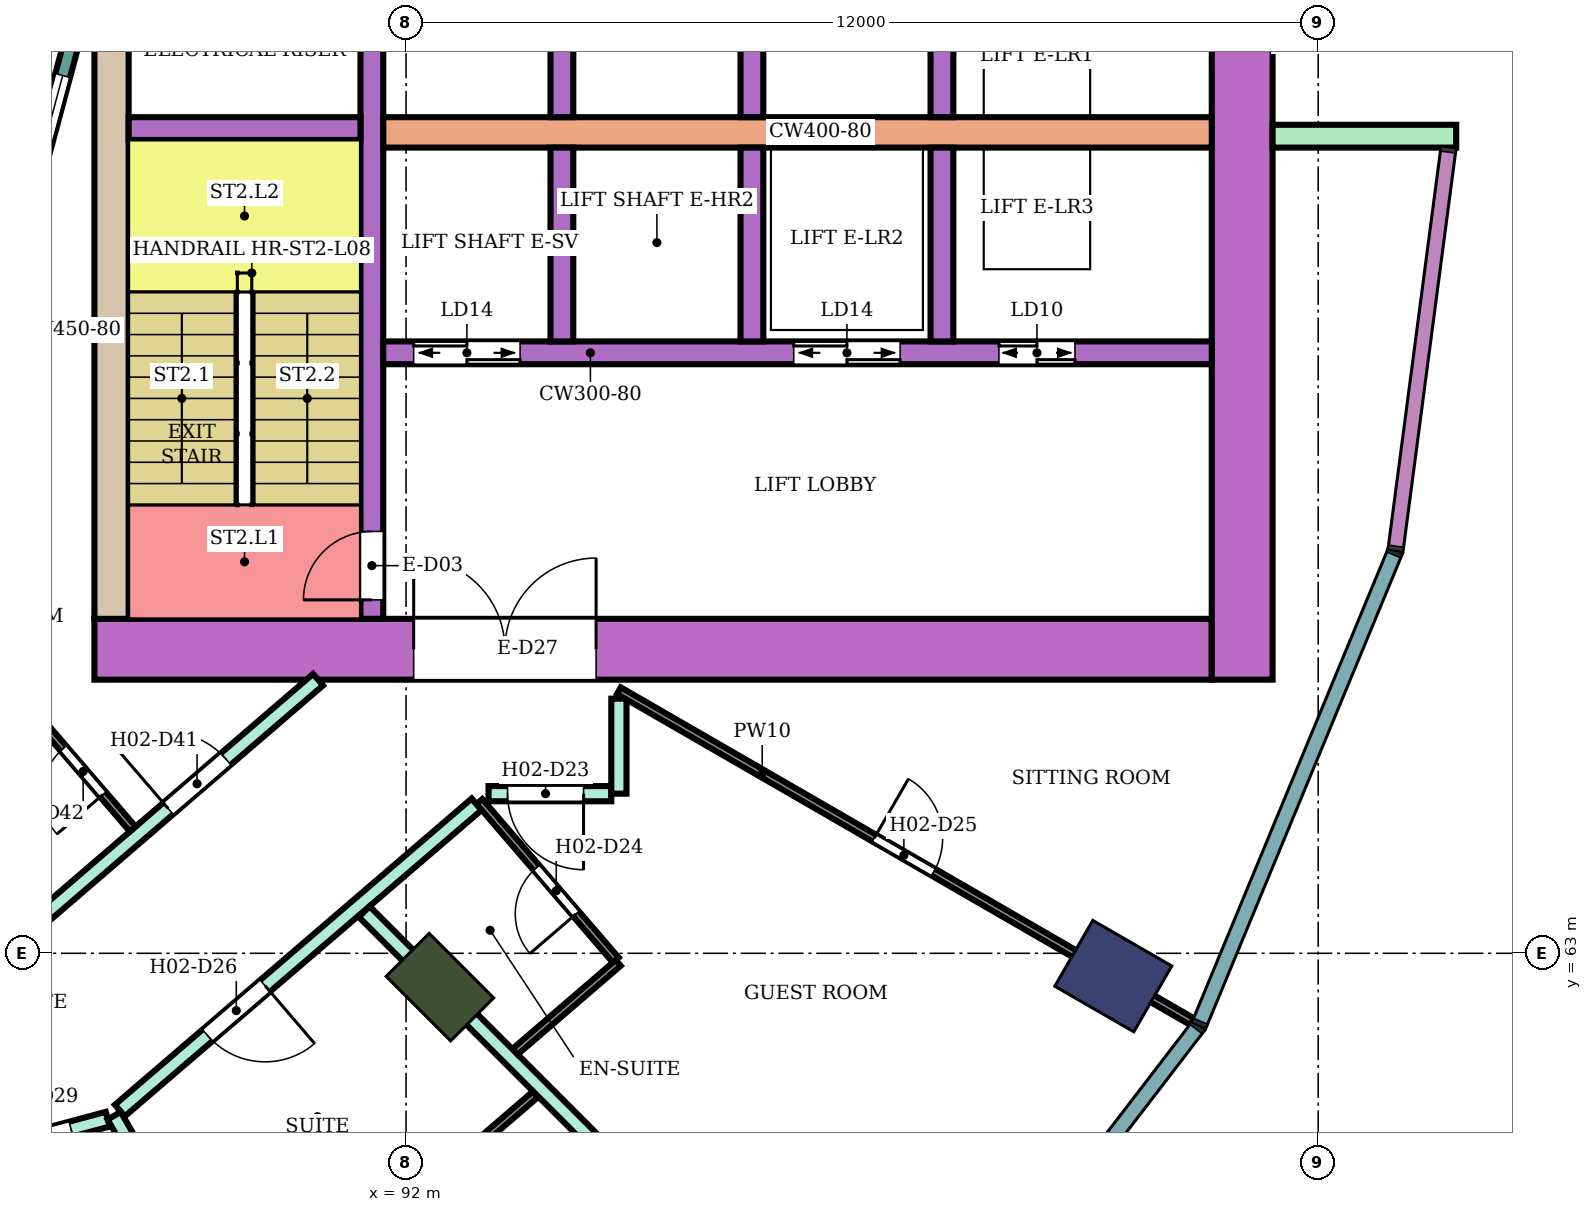
"""IFC4 building model, lengths in metres.
Left out: names, types, materials, properties, quantities, classifications, styles, units other than length and angle.
Written with IfcOpenShell. Run it as: python <this file> out.ifc"""

import sys

from ifc_helpers import new_model, si_unit, direction, frame, frame_2d, origin, origin_2d, place, context, subcontext, project, spatial, rectangle, extrude, element, fill, save


model = new_model("IFC4")
c1 = context("Model", 3, precision=1e-05, world=origin(), true_north=direction((0.0, 1.0)))
c2 = subcontext(c1, "Body", "Model", "MODEL_VIEW")
j1 = project(units=[si_unit("LENGTHUNIT", "METRE"), si_unit("PLANEANGLEUNIT", "RADIAN")], contexts=[c1])
p1 = place(None, origin())
s1 = spatial("IfcSite", under=j1, at=p1, CompositionType="ELEMENT")
p2 = place(p1, origin())
s2 = spatial("IfcBuilding", under=s1, at=p2, CompositionType="ELEMENT")
p3 = place(p2, frame((0.0, 0.0, 40.2)))
s3 = spatial("IfcBuildingStorey", under=s2, at=p3, CompositionType="ELEMENT", Elevation=40.2)
p4 = place(p3, frame((101.304, 62.7, 0.0), z_axis=(0.0, 0.0, 1.0), x_axis=(0.866025403784, -0.5, 0.0)))
e1 = element("IfcColumn", 1, at=p4, inside=s3, PredefinedType="COLUMN", context=c2, shape_type="SweptSolid", body=[
    extrude(rectangle(XDim=1.2, YDim=1.0, at=origin_2d()), origin(), (0.0, 0.0, 1.0), 3.8),
])
p5 = place(p3, frame((92.445, 62.555, 0.0), z_axis=(0.0, 0.0, 1.0), x_axis=(0.707106781187, -0.707106781187, 0.0)))
e2 = element("IfcColumn", 2, at=p5, inside=s3, PredefinedType="COLUMN", context=c2, shape_type="SweptSolid", body=[
    extrude(rectangle(XDim=1.2, YDim=0.8, at=origin_2d()), origin(), (0.0, 0.0, 1.0), 3.8),
])
p6 = place(p3, frame((87.9, 67.0, 0.0), z_axis=(0.0, 0.0, 1.0), x_axis=(1.0, 0.0, 0.0)))
e3 = element("IfcWall", 3, at=p6, inside=s3, PredefinedType="SHEAR", context=c2, shape_type="SweptSolid", body=[
    extrude(rectangle(XDim=14.7, YDim=0.8, at=frame_2d((7.35, 0.0))), origin(), (0.0, 0.0, 1.0), 3.48),
])
p7 = place(p6, frame((4.2, 0.0, 0.0)))
e4 = element("IfcOpeningElement", 4, at=p7, cuts=e3, PredefinedType="OPENING", context=c2, shape_type="SweptSolid", body=[
    extrude(rectangle(XDim=2.4, YDim=2.4, at=frame_2d((1.2, 1.2))), frame((0.0, 0.41, 0.0), z_axis=(0.0, -1.0, 0.0), x_axis=(1.0, 0.0, 0.0)), (0.0, 0.0, 1.0), 0.82),
])
p8 = place(p3, frame((88.125, 67.4, 0.0), z_axis=(0.0, 0.0, 1.0), x_axis=(0.0, 1.0, 0.0)))
e5 = element("IfcWall", 5, at=p8, inside=s3, PredefinedType="SHEAR", context=c2, shape_type="SweptSolid", body=[
    extrude(rectangle(XDim=7.6, YDim=0.45, at=frame_2d((3.8, 0.0))), origin(), (0.0, 0.0, 1.0), 3.48),
])
p9 = place(p3, frame((103.0, 66.6, 0.0), z_axis=(0.0, 0.0, 1.0), x_axis=(0.0, 1.0, 0.0)))
e6 = element("IfcWall", 6, at=p9, inside=s3, PredefinedType="SHEAR", context=c2, shape_type="SweptSolid", body=[
    extrude(rectangle(XDim=16.8, YDim=0.8, at=frame_2d((8.4, 0.0))), origin(), (0.0, 0.0, 1.0), 3.48),
])
p10 = place(p3, frame((91.55, 67.4, 0.0), z_axis=(0.0, 0.0, 1.0), x_axis=(0.0, 1.0, 0.0)))
e7 = element("IfcWall", 7, at=p10, inside=s3, PredefinedType="SHEAR", context=c2, shape_type="SweptSolid", body=[
    extrude(rectangle(XDim=7.6, YDim=0.3, at=frame_2d((3.8, 0.0))), origin(), (0.0, 0.0, 1.0), 3.48),
])
p11 = place(p10, frame((0.25, 0.0, 0.0)))
e8 = element("IfcOpeningElement", 8, at=p11, cuts=e7, PredefinedType="OPENING", context=c2, shape_type="SweptSolid", body=[
    extrude(rectangle(XDim=0.9, YDim=2.1, at=frame_2d((0.45, 1.05))), frame((0.0, 0.16, 0.0), z_axis=(0.0, -1.0, 0.0), x_axis=(1.0, 0.0, 0.0)), (0.0, 0.0, 1.0), 0.32),
])
p12 = place(p3, frame((88.35, 73.85, 0.0), z_axis=(0.0, 0.0, 1.0), x_axis=(1.0, 0.0, 0.0)))
e9 = element("IfcWall", 9, at=p12, inside=s3, PredefinedType="SHEAR", context=c2, shape_type="SweptSolid", body=[
    extrude(rectangle(XDim=3.05, YDim=0.3, at=frame_2d((1.525, 0.0))), origin(), (0.0, 0.0, 1.0), 3.48),
])
p13 = place(p3, frame((91.7, 73.8, 0.0), z_axis=(0.0, 0.0, 1.0), x_axis=(1.0, 0.0, 0.0)))
e10 = element("IfcWall", 10, at=p13, inside=s3, PredefinedType="SHEAR", context=c2, shape_type="SweptSolid", body=[
    extrude(rectangle(XDim=10.9, YDim=0.4, at=frame_2d((5.45, 0.0))), origin(), (0.0, 0.0, 1.0), 3.48),
])
p14 = place(p3, frame((91.7, 70.9, 0.0), z_axis=(0.0, 0.0, 1.0), x_axis=(1.0, 0.0, 0.0)))
e11 = element("IfcWall", 11, at=p14, inside=s3, PredefinedType="SHEAR", context=c2, shape_type="SweptSolid", body=[
    extrude(rectangle(XDim=10.9, YDim=0.3, at=frame_2d((5.45, 0.0))), origin(), (0.0, 0.0, 1.0), 3.48),
])
p15 = place(p14, frame((0.4, 0.0, 0.0)))
e12 = element("IfcOpeningElement", 12, at=p15, cuts=e11, PredefinedType="OPENING", context=c2, shape_type="SweptSolid", body=[
    extrude(rectangle(XDim=1.4, YDim=2.1, at=frame_2d((0.7, 1.05))), frame((0.0, 0.16, 0.0), z_axis=(0.0, -1.0, 0.0), x_axis=(1.0, 0.0, 0.0)), (0.0, 0.0, 1.0), 0.32),
])
p16 = place(p14, frame((5.4, 0.0, 0.0)))
e13 = element("IfcOpeningElement", 13, at=p16, cuts=e11, PredefinedType="OPENING", context=c2, shape_type="SweptSolid", body=[
    extrude(rectangle(XDim=1.4, YDim=2.1, at=frame_2d((0.7, 1.05))), frame((0.0, 0.16, 0.0), z_axis=(0.0, -1.0, 0.0), x_axis=(1.0, 0.0, 0.0)), (0.0, 0.0, 1.0), 0.32),
])
p17 = place(p14, frame((8.1, 0.0, 0.0)))
e14 = element("IfcOpeningElement", 14, at=p17, cuts=e11, PredefinedType="OPENING", context=c2, shape_type="SweptSolid", body=[
    extrude(rectangle(XDim=1.0, YDim=2.1, at=frame_2d((0.5, 1.05))), frame((0.0, 0.16, 0.0), z_axis=(0.0, -1.0, 0.0), x_axis=(1.0, 0.0, 0.0)), (0.0, 0.0, 1.0), 0.32),
])
for number, where, z_axis, x_axis in (
    (15, (94.05, 74.0, 0.0), (0.0, 0.0, 1.0), (0.0, 1.0, 0.0)),
    (16, (96.55, 74.0, 0.0), (0.0, 0.0, 1.0), (0.0, 1.0, 0.0)),
    (17, (99.05, 74.0, 0.0), (0.0, 0.0, 1.0), (0.0, 1.0, 0.0)),
    (18, (94.05, 71.05, 0.0), (0.0, 0.0, 1.0), (0.0, 1.0, 0.0)),
    (19, (96.55, 71.05, 0.0), (0.0, 0.0, 1.0), (0.0, 1.0, 0.0)),
    (20, (99.05, 71.05, 0.0), (0.0, 0.0, 1.0), (0.0, 1.0, 0.0)),
):
    element("IfcWall", number, at=place(p3, frame(where, z_axis=z_axis, x_axis=x_axis)), inside=s3, PredefinedType="SHEAR", context=c2, shape_type="SweptSolid", body=[
        extrude(rectangle(XDim=2.55, YDim=0.3, at=frame_2d((1.275, 0.0))), origin(), (0.0, 0.0, 1.0), 3.48),
    ])
p18 = place(p3, frame((103.4, 73.75, 0.0), z_axis=(0.0, 0.0, 1.0), x_axis=(1.0, 0.0, 0.0)))
e21 = element("IfcWall", 21, at=p18, inside=s3, PredefinedType="NOTDEFINED", context=c2, shape_type="SweptSolid", body=[
    extrude(rectangle(XDim=2.416, YDim=0.3, at=frame_2d((1.208, 0.0))), origin(), (0.0, 0.0, 1.0), 3.8),
])
p19 = place(p3, frame((86.585, 71.198, 0.0), z_axis=(0.0, 0.0, 1.0), x_axis=(0.258789828301, 0.965933654434, 0.0)))
e22 = element("IfcWall", 22, at=p19, inside=s3, PredefinedType="NOTDEFINED", context=c2, shape_type="SweptSolid", body=[
    extrude(rectangle(XDim=3.936, YDim=0.2, at=frame_2d((1.968, 0.0))), origin(), (0.0, 0.0, 1.0), 3.8),
])
p20 = place(p19, frame((0.468, 0.0, 0.9)))
e23 = element("IfcOpeningElement", 23, at=p20, cuts=e22, PredefinedType="OPENING", context=c2, shape_type="SweptSolid", body=[
    extrude(rectangle(XDim=3.0, YDim=2.3, at=frame_2d((1.5, 1.15))), frame((0.0, 0.11, 0.0), z_axis=(0.0, -1.0, 0.0), x_axis=(1.0, 0.0, 0.0)), (0.0, 0.0, 1.0), 0.22),
])
p21 = place(p3, frame((80.0, 58.655, 0.0), z_axis=(0.0, 0.0, 1.0), x_axis=(0.965967338894, 0.258664068224, 0.0)))
e24 = element("IfcWall", 24, at=p21, inside=s3, PredefinedType="PARTITIONING", context=c2, shape_type="SweptSolid", body=[
    extrude(rectangle(XDim=8.36, YDim=0.2, at=frame_2d((4.18, 0.0))), origin(), (0.0, 0.0, 1.0), 3.35),
])
p22 = place(p21, frame((6.86, 0.0, 0.0)))
e25 = element("IfcOpeningElement", 25, at=p22, cuts=e24, PredefinedType="OPENING", context=c2, shape_type="SweptSolid", body=[
    extrude(rectangle(XDim=1.0, YDim=2.1, at=frame_2d((0.5, 1.05))), frame((0.0, 0.11, 0.0), z_axis=(0.0, -1.0, 0.0), x_axis=(1.0, 0.0, 0.0)), (0.0, 0.0, 1.0), 0.22),
])
p23 = place(p21, frame((1.675, 0.0, 0.0)))
e26 = element("IfcOpeningElement", 26, at=p23, cuts=e24, PredefinedType="OPENING", context=c2, shape_type="SweptSolid", body=[
    extrude(rectangle(XDim=0.9, YDim=2.1, at=frame_2d((0.45, 1.05))), frame((0.0, 0.11, 0.0), z_axis=(0.0, -1.0, 0.0), x_axis=(1.0, 0.0, 0.0)), (0.0, 0.0, 1.0), 0.22),
])
p24 = place(p3, frame((86.877, 63.189, 0.0), z_axis=(0.0, 0.0, 1.0), x_axis=(0.758164888471, 0.652062881853, 0.0)))
e27 = element("IfcWall", 27, at=p24, inside=s3, PredefinedType="PARTITIONING", context=c2, shape_type="SweptSolid", body=[
    extrude(rectangle(XDim=5.23, YDim=0.2, at=frame_2d((2.615, 0.0))), origin(), (0.0, 0.0, 1.0), 3.35),
])
p25 = place(p24, frame((2.63, 0.0, 0.0)))
e28 = element("IfcOpeningElement", 28, at=p25, cuts=e27, PredefinedType="OPENING", context=c2, shape_type="SweptSolid", body=[
    extrude(rectangle(XDim=1.0, YDim=2.1, at=frame_2d((0.5, 1.05))), frame((0.0, 0.11, 0.0), z_axis=(0.0, -1.0, 0.0), x_axis=(1.0, 0.0, 0.0)), (0.0, 0.0, 1.0), 0.22),
])
p26 = place(p3, frame((88.235, 60.931, 0.0), z_axis=(0.0, 0.0, 1.0), x_axis=(0.758799498714, 0.651324282329, 0.0)))
e29 = element("IfcWall", 29, at=p26, inside=s3, PredefinedType="PARTITIONING", context=c2, shape_type="SweptSolid", body=[
    extrude(rectangle(XDim=6.186, YDim=0.2, at=frame_2d((3.093, 0.0))), origin(), (0.0, 0.0, 1.0), 3.35),
])
p27 = place(p26, frame((1.519, 0.0, 0.0)))
e30 = element("IfcOpeningElement", 30, at=p27, cuts=e29, PredefinedType="OPENING", context=c2, shape_type="SweptSolid", body=[
    extrude(rectangle(XDim=1.0, YDim=2.1, at=frame_2d((0.5, 1.05))), frame((0.0, 0.11, 0.0), z_axis=(0.0, -1.0, 0.0), x_axis=(1.0, 0.0, 0.0)), (0.0, 0.0, 1.0), 0.22),
])
p28 = place(p3, frame((88.159, 60.863, 0.0), z_axis=(0.0, 0.0, 1.0), x_axis=(0.499897184548, -0.866084756177, 0.0)))
e31 = element("IfcWall", 31, at=p28, inside=s3, PredefinedType="PARTITIONING", context=c2, shape_type="SweptSolid", body=[
    extrude(rectangle(XDim=9.475, YDim=0.2, at=frame_2d((4.737, 0.0))), origin(), (0.0, 0.0, 1.0), 3.35),
])
p29 = place(p3, frame((91.449, 63.548, 0.0), z_axis=(0.0, 0.0, 1.0), x_axis=(0.706984810649, -0.707228730688, 0.0)))
e32 = element("IfcWall", 32, at=p29, inside=s3, PredefinedType="PARTITIONING", context=c2, shape_type="SweptSolid", body=[
    extrude(rectangle(XDim=7.006, YDim=0.2, at=frame_2d((3.503, 0.0))), origin(), (0.0, 0.0, 1.0), 3.35),
])
p30 = place(p3, frame((93.085, 65.1, 0.0), z_axis=(0.0, 0.0, 1.0), x_axis=(1.0, 0.0, 0.0)))
e33 = element("IfcWall", 33, at=p30, inside=s3, PredefinedType="PARTITIONING", context=c2, shape_type="SweptSolid", body=[
    extrude(rectangle(XDim=1.615, YDim=0.2, at=frame_2d((0.808, 0.0))), origin(), (0.0, 0.0, 1.0), 3.35),
])
p31 = place(p30, frame((0.25, 0.0, 0.0)))
e34 = element("IfcOpeningElement", 34, at=p31, cuts=e33, PredefinedType="OPENING", context=c2, shape_type="SweptSolid", body=[
    extrude(rectangle(XDim=1.0, YDim=2.1, at=frame_2d((0.5, 1.05))), frame((0.0, 0.11, 0.0), z_axis=(0.0, -1.0, 0.0), x_axis=(1.0, 0.0, 0.0)), (0.0, 0.0, 1.0), 0.22),
])
p32 = place(p3, frame((94.8, 65.1, 0.0), z_axis=(0.0, 0.0, 1.0), x_axis=(0.0, 1.0, 0.0)))
e35 = element("IfcWall", 35, at=p32, inside=s3, PredefinedType="PARTITIONING", context=c2, shape_type="SweptSolid", body=[
    extrude(rectangle(XDim=1.25, YDim=0.2, at=frame_2d((0.625, 0.0))), origin(), (0.0, 0.0, 1.0), 3.35),
])
p33 = place(p3, frame((86.643, 66.681, 0.0), z_axis=(0.0, 0.0, 1.0), x_axis=(0.652264876065, -0.757991115682, 0.0)))
e36 = element("IfcWall", 36, at=p33, inside=s3, PredefinedType="PARTITIONING", context=c2, shape_type="SweptSolid", body=[
    extrude(rectangle(XDim=2.699, YDim=0.1, at=frame_2d((1.35, 0.0))), origin(), (0.0, 0.0, 1.0), 3.35),
])
p34 = place(p33, frame((1.3, 0.0, 0.0)))
e37 = element("IfcOpeningElement", 37, at=p34, cuts=e36, PredefinedType="OPENING", context=c2, shape_type="SweptSolid", body=[
    extrude(rectangle(XDim=0.8, YDim=2.1, at=frame_2d((0.4, 1.05))), frame((0.0, 0.06, 0.0), z_axis=(0.0, -1.0, 0.0), x_axis=(1.0, 0.0, 0.0)), (0.0, 0.0, 1.0), 0.12),
])
p35 = place(p3, frame((89.974, 57.94, 0.0), z_axis=(0.0, 0.0, 1.0), x_axis=(0.75821417454, 0.652005571699, 0.0)))
e38 = element("IfcWall", 38, at=p35, inside=s3, PredefinedType="PARTITIONING", context=c2, shape_type="SweptSolid", body=[
    extrude(rectangle(XDim=4.915, YDim=0.1, at=frame_2d((2.457, 0.0))), origin(), (0.0, 0.0, 1.0), 3.35),
])
p36 = place(p35, frame((1.017, 0.0, 0.0)))
e39 = element("IfcOpeningElement", 39, at=p36, cuts=e38, PredefinedType="OPENING", context=c2, shape_type="SweptSolid", body=[
    extrude(rectangle(XDim=0.9, YDim=2.1, at=frame_2d((0.45, 1.05))), frame((0.0, 0.06, 0.0), z_axis=(0.0, -1.0, 0.0), x_axis=(1.0, 0.0, 0.0)), (0.0, 0.0, 1.0), 0.12),
])
p37 = place(p3, frame((92.965, 64.997, 0.0), z_axis=(0.0, 0.0, 1.0), x_axis=(0.652069888227, -0.758158862553, 0.0)))
e40 = element("IfcWall", 40, at=p37, inside=s3, PredefinedType="PARTITIONING", context=c2, shape_type="SweptSolid", body=[
    extrude(rectangle(XDim=2.75, YDim=0.1, at=frame_2d((1.375, 0.0))), origin(), (0.0, 0.0, 1.0), 3.35),
])
p38 = place(p37, frame((1.15, 0.0, 0.0)))
e41 = element("IfcOpeningElement", 41, at=p38, cuts=e40, PredefinedType="OPENING", context=c2, shape_type="SweptSolid", body=[
    extrude(rectangle(XDim=0.8, YDim=2.1, at=frame_2d((0.4, 1.05))), frame((0.0, 0.06, 0.0), z_axis=(0.0, -1.0, 0.0), x_axis=(1.0, 0.0, 0.0)), (0.0, 0.0, 1.0), 0.12),
])
p39 = place(p3, frame((93.435, 61.707, 0.0), z_axis=(0.0, 0.0, 1.0), x_axis=(0.758070495124, 0.652172618578, 0.0)))
e42 = element("IfcWall", 42, at=p39, inside=s3, PredefinedType="PARTITIONING", context=c2, shape_type="SweptSolid", body=[
    extrude(rectangle(XDim=1.789, YDim=0.1, at=frame_2d((0.895, 0.0))), origin(), (0.0, 0.0, 1.0), 3.35),
])
p40 = place(p3, frame((94.8, 66.455, 0.0), z_axis=(0.0, 0.0, 1.0), x_axis=(0.86602264145, -0.500004784474, 0.0)))
e43 = element("IfcWall", 43, at=p40, inside=s3, PredefinedType="PARTITIONING", context=c2, shape_type="SweptSolid", body=[
    extrude(rectangle(XDim=8.708, YDim=0.1, at=frame_2d((4.354, 0.0))), origin(), (0.0, 0.0, 1.0), 3.35),
])
p41 = place(p40, frame((3.879, 0.0, 0.0)))
e44 = element("IfcOpeningElement", 44, at=p41, cuts=e43, PredefinedType="OPENING", context=c2, shape_type="SweptSolid", body=[
    extrude(rectangle(XDim=0.9, YDim=2.1, at=frame_2d((0.45, 1.05))), frame((0.0, 0.06, 0.0), z_axis=(0.0, -1.0, 0.0), x_axis=(1.0, 0.0, 0.0)), (0.0, 0.0, 1.0), 0.12),
])
p42 = place(p20, origin())
e45 = element("IfcWindow", 45, at=p42, inside=s3, PartitioningType="SINGLE_PANEL", PredefinedType="WINDOW", context=c2, shape_type="SweptSolid", body=[
    extrude(rectangle(XDim=3.0, YDim=2.3, at=frame_2d((1.5, 1.15))), frame((0.0, 0.03, 0.0), z_axis=(0.0, -1.0, 0.0), x_axis=(1.0, 0.0, 0.0)), (0.0, 0.0, 1.0), 0.06),
])
fill(e23, e45)
p43 = place(p31, frame((1.0, 0.0, 0.0), z_axis=(0.0, 0.0, 1.0), x_axis=(-1.0, 0.0, 0.0)))
e46 = element("IfcDoor", 46, at=p43, inside=s3, OperationType="SINGLE_SWING_LEFT", PredefinedType="DOOR", context=c2, shape_type="SweptSolid", body=[
    extrude(rectangle(XDim=1.0, YDim=2.1, at=frame_2d((0.5, 1.05))), frame((0.0, 0.025, 0.0), z_axis=(0.0, -1.0, 0.0), x_axis=(1.0, 0.0, 0.0)), (0.0, 0.0, 1.0), 0.05),
])
fill(e34, e46)
p44 = place(p38, frame((0.8, 0.0, 0.0), z_axis=(0.0, 0.0, 1.0), x_axis=(-1.0, 0.0, 0.0)))
e47 = element("IfcDoor", 47, at=p44, inside=s3, OperationType="SINGLE_SWING_LEFT", PredefinedType="DOOR", context=c2, shape_type="SweptSolid", body=[
    extrude(rectangle(XDim=0.8, YDim=2.1, at=frame_2d((0.4, 1.05))), frame((0.0, 0.025, 0.0), z_axis=(0.0, -1.0, 0.0), x_axis=(1.0, 0.0, 0.0)), (0.0, 0.0, 1.0), 0.05),
])
fill(e41, e47)
p45 = place(p41, origin())
e48 = element("IfcDoor", 48, at=p45, inside=s3, OperationType="SINGLE_SWING_LEFT", PredefinedType="DOOR", context=c2, shape_type="SweptSolid", body=[
    extrude(rectangle(XDim=0.9, YDim=2.1, at=frame_2d((0.45, 1.05))), frame((0.0, 0.025, 0.0), z_axis=(0.0, -1.0, 0.0), x_axis=(1.0, 0.0, 0.0)), (0.0, 0.0, 1.0), 0.05),
])
fill(e44, e48)
p46 = place(p27, frame((1.0, 0.0, 0.0), z_axis=(0.0, 0.0, 1.0), x_axis=(-1.0, 0.0, 0.0)))
e49 = element("IfcDoor", 49, at=p46, inside=s3, OperationType="SINGLE_SWING_LEFT", PredefinedType="DOOR", context=c2, shape_type="SweptSolid", body=[
    extrude(rectangle(XDim=1.0, YDim=2.1, at=frame_2d((0.5, 1.05))), frame((0.0, 0.025, 0.0), z_axis=(0.0, -1.0, 0.0), x_axis=(1.0, 0.0, 0.0)), (0.0, 0.0, 1.0), 0.05),
])
fill(e30, e49)
p47 = place(p22, frame((1.0, 0.0, 0.0), z_axis=(0.0, 0.0, 1.0), x_axis=(-1.0, 0.0, 0.0)))
e50 = element("IfcDoor", 50, at=p47, inside=s3, OperationType="SINGLE_SWING_RIGHT", PredefinedType="DOOR", context=c2, shape_type="SweptSolid", body=[
    extrude(rectangle(XDim=1.0, YDim=2.1, at=frame_2d((0.5, 1.05))), frame((0.0, 0.025, 0.0), z_axis=(0.0, -1.0, 0.0), x_axis=(1.0, 0.0, 0.0)), (0.0, 0.0, 1.0), 0.05),
])
fill(e25, e50)
p48 = place(p25, origin())
e51 = element("IfcDoor", 51, at=p48, inside=s3, OperationType="SINGLE_SWING_LEFT", PredefinedType="DOOR", context=c2, shape_type="SweptSolid", body=[
    extrude(rectangle(XDim=1.0, YDim=2.1, at=frame_2d((0.5, 1.05))), frame((0.0, 0.025, 0.0), z_axis=(0.0, -1.0, 0.0), x_axis=(1.0, 0.0, 0.0)), (0.0, 0.0, 1.0), 0.05),
])
fill(e28, e51)
p49 = place(p34, frame((0.8, 0.0, 0.0), z_axis=(0.0, 0.0, 1.0), x_axis=(-1.0, 0.0, 0.0)))
e52 = element("IfcDoor", 52, at=p49, inside=s3, OperationType="SINGLE_SWING_LEFT", PredefinedType="DOOR", context=c2, shape_type="SweptSolid", body=[
    extrude(rectangle(XDim=0.8, YDim=2.1, at=frame_2d((0.4, 1.05))), frame((0.0, 0.025, 0.0), z_axis=(0.0, -1.0, 0.0), x_axis=(1.0, 0.0, 0.0)), (0.0, 0.0, 1.0), 0.05),
])
fill(e37, e52)
p50 = place(p11, origin())
e53 = element("IfcDoor", 53, at=p50, inside=s3, OperationType="SINGLE_SWING_LEFT", PredefinedType="DOOR", context=c2, shape_type="SweptSolid", body=[
    extrude(rectangle(XDim=0.9, YDim=2.1, at=frame_2d((0.45, 1.05))), frame((0.0, 0.025, 0.0), z_axis=(0.0, -1.0, 0.0), x_axis=(1.0, 0.0, 0.0)), (0.0, 0.0, 1.0), 0.05),
])
fill(e8, e53)
p51 = place(p15, origin())
e54 = element("IfcDoor", 54, at=p51, inside=s3, OperationType="DOUBLE_DOOR_SLIDING", PredefinedType="DOOR", context=c2, shape_type="SweptSolid", body=[
    extrude(rectangle(XDim=1.4, YDim=2.1, at=frame_2d((0.7, 1.05))), frame((0.0, 0.025, 0.0), z_axis=(0.0, -1.0, 0.0), x_axis=(1.0, 0.0, 0.0)), (0.0, 0.0, 1.0), 0.05),
])
fill(e12, e54)
p52 = place(p16, origin())
e55 = element("IfcDoor", 55, at=p52, inside=s3, OperationType="DOUBLE_DOOR_SLIDING", PredefinedType="DOOR", context=c2, shape_type="SweptSolid", body=[
    extrude(rectangle(XDim=1.4, YDim=2.1, at=frame_2d((0.7, 1.05))), frame((0.0, 0.025, 0.0), z_axis=(0.0, -1.0, 0.0), x_axis=(1.0, 0.0, 0.0)), (0.0, 0.0, 1.0), 0.05),
])
fill(e13, e55)
p53 = place(p17, origin())
e56 = element("IfcDoor", 56, at=p53, inside=s3, OperationType="DOUBLE_DOOR_SLIDING", PredefinedType="DOOR", context=c2, shape_type="SweptSolid", body=[
    extrude(rectangle(XDim=1.0, YDim=2.1, at=frame_2d((0.5, 1.05))), frame((0.0, 0.025, 0.0), z_axis=(0.0, -1.0, 0.0), x_axis=(1.0, 0.0, 0.0)), (0.0, 0.0, 1.0), 0.05),
])
fill(e14, e56)
p54 = place(p7, origin())
e57 = element("IfcDoor", 57, at=p54, inside=s3, OperationType="DOUBLE_DOOR_SINGLE_SWING", PredefinedType="DOOR", context=c2, shape_type="SweptSolid", body=[
    extrude(rectangle(XDim=2.4, YDim=2.4, at=frame_2d((1.2, 1.2))), frame((0.0, 0.025, 0.0), z_axis=(0.0, -1.0, 0.0), x_axis=(1.0, 0.0, 0.0)), (0.0, 0.0, 1.0), 0.05),
])
fill(e4, e57)
save(model, sys.argv[1])
